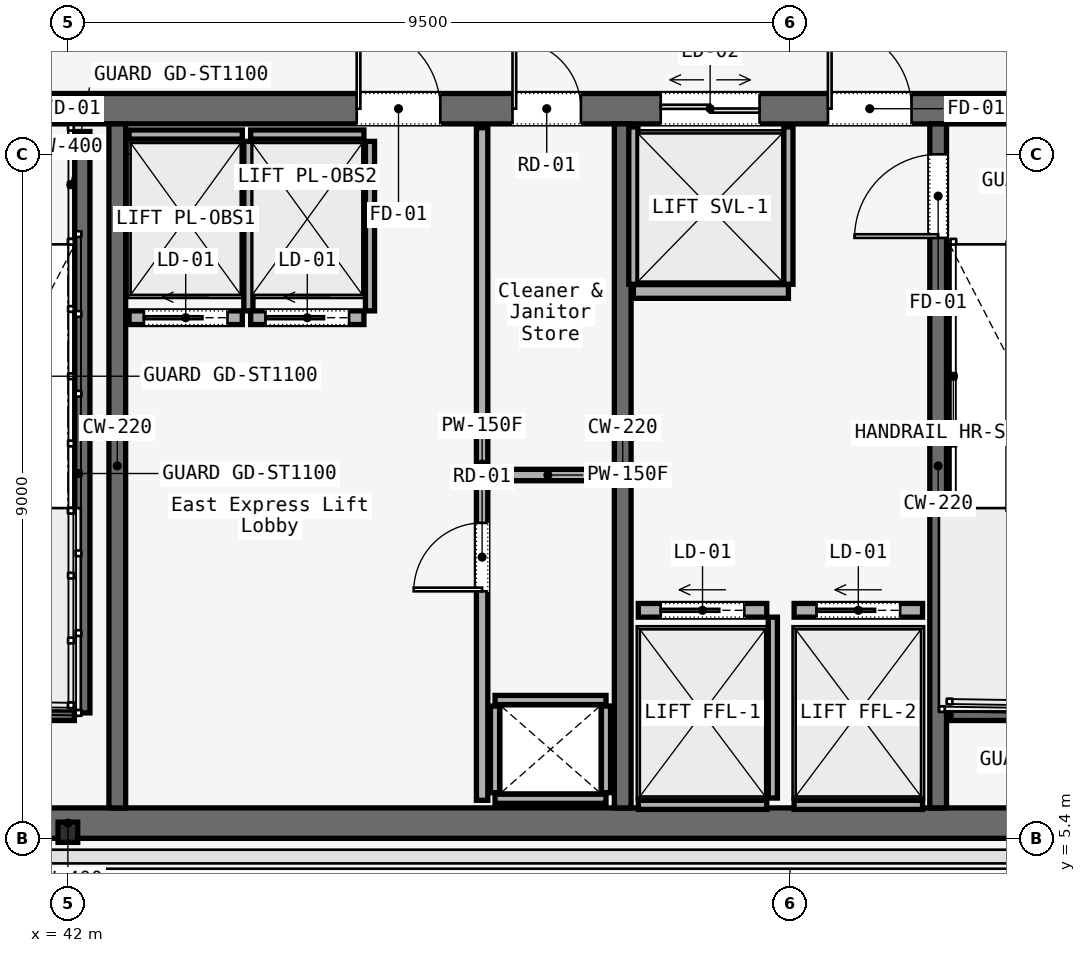
"""IFC4 building model, lengths in metres.
Left out: names, types, materials, properties, quantities, classifications, styles, units other than length and angle.
Written with IfcOpenShell. Run it as: python <this file> out.ifc"""

import sys

from ifc_helpers import new_model, si_unit, direction, frame, frame_2d, origin, origin_2d, place, context, subcontext, project, spatial, rectangle, i_section, extrude, element, fill, save


model = new_model("IFC4")
c1 = context("Model", 3, precision=1e-05, world=origin(), true_north=direction((0.0, 1.0)))
c2 = subcontext(c1, "Body", "Model", "MODEL_VIEW")
j1 = project(units=[si_unit("LENGTHUNIT", "METRE"), si_unit("PLANEANGLEUNIT", "RADIAN")], contexts=[c1])
p1 = place(None, origin())
s1 = spatial("IfcSite", under=j1, at=p1, CompositionType="ELEMENT")
p2 = place(p1, origin())
s2 = spatial("IfcBuilding", under=s1, at=p2, CompositionType="ELEMENT")
p3 = place(p2, frame((0.0, 0.0, 303.3)))
s3 = spatial("IfcBuildingStorey", under=s2, at=p3, CompositionType="ELEMENT", Elevation=303.3)
p4 = place(p3, frame((26.45, 15.0, 0.0), z_axis=(0.0, 0.0, 1.0), x_axis=(1.0, 0.0, 0.0)))
e1 = element("IfcWall", 1, at=p4, inside=s3, PredefinedType="SOLIDWALL", context=c2, shape_type="SweptSolid", body=[
    extrude(rectangle(XDim=31.1, YDim=0.4, at=frame_2d((15.55, 0.0))), origin(), (0.0, 0.0, 1.0), 4.4),
])
p5 = place(p4, frame((1.65, 0.0, 0.0)))
e2 = element("IfcOpeningElement", 2, at=p5, cuts=e1, PredefinedType="OPENING", context=c2, shape_type="SweptSolid", body=[
    extrude(rectangle(XDim=1.1, YDim=2.2, at=frame_2d((0.55, 1.1))), frame((0.0, 0.2, 0.0), z_axis=(0.0, -1.0, 0.0), x_axis=(1.0, 0.0, 0.0)), (0.0, 0.0, 1.0), 0.4),
])
p6 = place(p4, frame((13.65, 0.0, 0.0)))
e3 = element("IfcOpeningElement", 3, at=p6, cuts=e1, PredefinedType="OPENING", context=c2, shape_type="SweptSolid", body=[
    extrude(rectangle(XDim=1.1, YDim=2.2, at=frame_2d((0.55, 1.1))), frame((0.0, 0.2, 0.0), z_axis=(0.0, -1.0, 0.0), x_axis=(1.0, 0.0, 0.0)), (0.0, 0.0, 1.0), 0.4),
])
p7 = place(p4, frame((25.55, 0.0, 0.0)))
e4 = element("IfcOpeningElement", 4, at=p7, cuts=e1, PredefinedType="OPENING", context=c2, shape_type="SweptSolid", body=[
    extrude(rectangle(XDim=1.1, YDim=2.2, at=frame_2d((0.55, 1.1))), frame((0.0, 0.2, 0.0), z_axis=(0.0, -1.0, 0.0), x_axis=(1.0, 0.0, 0.0)), (0.0, 0.0, 1.0), 0.4),
])
p8 = place(p4, frame((19.35, 0.0, 0.0)))
e5 = element("IfcOpeningElement", 5, at=p8, cuts=e1, PredefinedType="OPENING", context=c2, shape_type="SweptSolid", body=[
    extrude(rectangle(XDim=1.1, YDim=2.2, at=frame_2d((0.55, 1.1))), frame((0.0, 0.2, 0.0), z_axis=(0.0, -1.0, 0.0), x_axis=(1.0, 0.0, 0.0)), (0.0, 0.0, 1.0), 0.4),
])
p9 = place(p4, frame((21.4, 0.0, 0.0)))
e6 = element("IfcOpeningElement", 6, at=p9, cuts=e1, PredefinedType="OPENING", context=c2, shape_type="SweptSolid", body=[
    extrude(rectangle(XDim=0.9, YDim=2.1, at=frame_2d((0.45, 1.05))), frame((0.0, 0.2, 0.0), z_axis=(0.0, -1.0, 0.0), x_axis=(1.0, 0.0, 0.0)), (0.0, 0.0, 1.0), 0.4),
])
p10 = place(p4, frame((6.04, 0.0, 0.0)))
e7 = element("IfcOpeningElement", 7, at=p10, cuts=e1, PredefinedType="OPENING", context=c2, shape_type="SweptSolid", body=[
    extrude(rectangle(XDim=0.95, YDim=2.2, at=frame_2d((0.475, 1.1))), frame((0.0, 0.2, 0.0), z_axis=(0.0, -1.0, 0.0), x_axis=(1.0, 0.0, 0.0)), (0.0, 0.0, 1.0), 0.4),
])
p11 = place(p4, frame((9.99, 0.0, 0.0)))
e8 = element("IfcOpeningElement", 8, at=p11, cuts=e1, PredefinedType="OPENING", context=c2, shape_type="SweptSolid", body=[
    extrude(rectangle(XDim=0.95, YDim=2.2, at=frame_2d((0.475, 1.1))), frame((0.0, 0.2, 0.0), z_axis=(0.0, -1.0, 0.0), x_axis=(1.0, 0.0, 0.0)), (0.0, 0.0, 1.0), 0.4),
])
p12 = place(p4, frame((23.35, 0.0, 0.0)))
e9 = element("IfcOpeningElement", 9, at=p12, cuts=e1, PredefinedType="OPENING", context=c2, shape_type="SweptSolid", body=[
    extrude(rectangle(XDim=1.3, YDim=2.3, at=frame_2d((0.65, 1.15))), frame((0.0, 0.2, 0.0), z_axis=(0.0, -1.0, 0.0), x_axis=(1.0, 0.0, 0.0)), (0.0, 0.0, 1.0), 0.4),
])
p13 = place(p3, frame((26.45, 5.6, 0.0), z_axis=(0.0, 0.0, 1.0), x_axis=(1.0, 0.0, 0.0)))
e10 = element("IfcWall", 10, at=p13, inside=s3, PredefinedType="SOLIDWALL", context=c2, shape_type="SweptSolid", body=[
    extrude(rectangle(XDim=31.1, YDim=0.4, at=frame_2d((15.55, 0.0))), origin(), (0.0, 0.0, 1.0), 4.4),
])
for number, where, z_axis, x_axis in (
    (11, (42.65, 5.8, 0.0), (0.0, 0.0, 1.0), (0.0, 1.0, 0.0)),
    (12, (49.3, 5.8, 0.0), (0.0, 0.0, 1.0), (0.0, 1.0, 0.0)),
):
    element("IfcWall", number, at=place(p3, frame(where, z_axis=z_axis, x_axis=x_axis)), inside=s3, PredefinedType="SOLIDWALL", context=c2, shape_type="SweptSolid", body=[
        extrude(rectangle(XDim=9.0, YDim=0.22, at=frame_2d((4.5, 0.0))), origin(), (0.0, 0.0, 1.0), 4.4),
    ])
p14 = place(p3, frame((53.45, 5.8, 0.0), z_axis=(0.0, 0.0, 1.0), x_axis=(0.0, 1.0, 0.0)))
e13 = element("IfcWall", 13, at=p14, inside=s3, PredefinedType="SOLIDWALL", context=c2, shape_type="SweptSolid", body=[
    extrude(rectangle(XDim=9.0, YDim=0.22, at=frame_2d((4.5, 0.0))), origin(), (0.0, 0.0, 1.0), 4.4),
])
p15 = place(p14, frame((7.5, 0.0, 0.0)))
e14 = element("IfcOpeningElement", 14, at=p15, cuts=e13, PredefinedType="OPENING", context=c2, shape_type="SweptSolid", body=[
    extrude(rectangle(XDim=1.1, YDim=2.2, at=frame_2d((0.55, 1.1))), frame((0.0, 0.11, 0.0), z_axis=(0.0, -1.0, 0.0), x_axis=(1.0, 0.0, 0.0)), (0.0, 0.0, 1.0), 0.22),
])
p16 = place(p3, frame((42.0, 5.48, 0.0), z_axis=(0.0, 0.0, 1.0), x_axis=(1.0, 0.0, 0.0)))
e15 = element("IfcColumn", 15, at=p16, inside=s3, PredefinedType="COLUMN", context=c2, shape_type="SweptSolid", body=[
    extrude(i_section(OverallWidth=0.259, OverallDepth=0.267, WebThickness=0.013, FlangeThickness=0.021, FilletRadius=0.013, at=origin_2d()), origin(), (0.0, 0.0, 1.0), 4.4),
])
p17 = place(p3, frame((42.19, 14.7, 0.0), z_axis=(0.0, 0.0, 1.0), x_axis=(0.0, -1.0, 0.0)))
e16 = element("IfcWall", 16, at=p17, inside=s3, PredefinedType="SOLIDWALL", context=c2, shape_type="SweptSolid", body=[
    extrude(rectangle(XDim=7.65, YDim=0.2, at=frame_2d((3.825, 0.0))), origin(), (0.0, 0.0, 1.0), 4.8),
])
for number, where, z_axis, x_axis in (
    (17, (38.97, 7.05, 0.0), (0.0, 0.0, 1.0), (1.0, 0.0, 0.0)),
    (18, (53.62, 7.05, 0.0), (0.0, 0.0, 1.0), (1.0, 0.0, 0.0)),
):
    element("IfcWall", number, at=place(p3, frame(where, z_axis=z_axis, x_axis=x_axis)), inside=s3, PredefinedType="SOLIDWALL", context=c2, shape_type="SweptSolid", body=[
        extrude(rectangle(XDim=3.115, YDim=0.2, at=frame_2d((1.558, 0.0))), origin(), (0.0, 0.0, 1.0), 4.8),
    ])
for number, where, z_axis, x_axis in (
    (19, (47.62, 5.92, 0.0), (0.0, 0.0, 1.0), (1.0, 0.0, 0.0)),
    (20, (47.62, 7.22, 0.0), (0.0, 0.0, 1.0), (1.0, 0.0, 0.0)),
):
    element("IfcWall", number, at=place(p3, frame(where, z_axis=z_axis, x_axis=x_axis)), inside=s3, PredefinedType="SOLIDWALL", context=c2, shape_type="SweptSolid", body=[
        extrude(rectangle(XDim=1.46, YDim=0.12, at=frame_2d((0.73, 0.0))), origin(), (0.0, 0.0, 1.0), 4.36),
    ])
for number, where, z_axis, x_axis in (
    (21, (47.62, 6.0, 0.0), (0.0, 0.0, 1.0), (0.0, 1.0, 0.0)),
    (22, (49.08, 6.0, 0.0), (0.0, 0.0, 1.0), (0.0, 1.0, 0.0)),
):
    element("IfcWall", number, at=place(p3, frame(where, z_axis=z_axis, x_axis=x_axis)), inside=s3, PredefinedType="SOLIDWALL", context=c2, shape_type="SweptSolid", body=[
        extrude(rectangle(XDim=1.14, YDim=0.12, at=frame_2d((0.57, 0.0))), origin(), (0.0, 0.0, 1.0), 4.36),
    ])
p18 = place(p3, frame((47.45, 5.9, 0.0), z_axis=(0.0, 0.0, 1.0), x_axis=(0.0, 1.0, 0.0)))
e23 = element("IfcWall", 23, at=p18, inside=s3, PredefinedType="PARTITIONING", context=c2, shape_type="SweptSolid", body=[
    extrude(rectangle(XDim=8.85, YDim=0.15, at=frame_2d((4.425, 0.0))), origin(), (0.0, 0.0, 1.0), 4.36),
])
p19 = place(p18, frame((2.75, 0.0, 0.0)))
e24 = element("IfcOpeningElement", 24, at=p19, cuts=e23, PredefinedType="OPENING", context=c2, shape_type="SweptSolid", body=[
    extrude(rectangle(XDim=0.9, YDim=2.1, at=frame_2d((0.45, 1.05))), frame((0.0, 0.075, 0.0), z_axis=(0.0, -1.0, 0.0), x_axis=(1.0, 0.0, 0.0)), (0.0, 0.0, 1.0), 0.15),
])
p20 = place(p3, frame((47.45, 10.18, 0.0), z_axis=(0.0, 0.0, 1.0), x_axis=(1.0, 0.0, 0.0)))
e25 = element("IfcWall", 25, at=p20, inside=s3, PredefinedType="PARTITIONING", context=c2, shape_type="SweptSolid", body=[
    extrude(rectangle(XDim=1.73, YDim=0.15, at=frame_2d((0.865, 0.0))), origin(), (0.0, 0.0, 1.0), 4.36),
])
p21 = place(p3, frame((42.805, 12.25, 0.0), z_axis=(0.0, 0.0, 1.0), x_axis=(1.0, 0.0, 0.0)))
e26 = element("IfcWall", 26, at=p21, inside=s3, PredefinedType="SOLIDWALL", context=c2, shape_type="SweptSolid", body=[
    extrude(rectangle(XDim=1.49, YDim=0.18, at=frame_2d((0.745, 0.0))), origin(), (0.0, 0.0, 1.0), 4.36),
])
p22 = place(p21, frame((0.195, 0.0, 0.0)))
e27 = element("IfcOpeningElement", 27, at=p22, cuts=e26, PredefinedType="OPENING", context=c2, shape_type="SweptSolid", body=[
    extrude(rectangle(XDim=1.1, YDim=2.2, at=frame_2d((0.55, 1.1))), frame((0.0, 0.09, 0.0), z_axis=(0.0, -1.0, 0.0), x_axis=(1.0, 0.0, 0.0)), (0.0, 0.0, 1.0), 0.18),
])
p23 = place(p3, frame((42.805, 14.66, 0.0), z_axis=(0.0, 0.0, 1.0), x_axis=(1.0, 0.0, 0.0)))
e28 = element("IfcWall", 28, at=p23, inside=s3, PredefinedType="SOLIDWALL", context=c2, shape_type="SweptSolid", body=[
    extrude(rectangle(XDim=1.49, YDim=0.12, at=frame_2d((0.745, 0.0))), origin(), (0.0, 0.0, 1.0), 4.36),
])
p24 = place(p3, frame((44.375, 12.34, 0.0), z_axis=(0.0, 0.0, 1.0), x_axis=(0.0, 1.0, 0.0)))
e29 = element("IfcWall", 29, at=p24, inside=s3, PredefinedType="SOLIDWALL", context=c2, shape_type="SweptSolid", body=[
    extrude(rectangle(XDim=2.23, YDim=0.12, at=frame_2d((1.115, 0.0))), origin(), (0.0, 0.0, 1.0), 4.36),
])
p25 = place(p3, frame((44.405, 12.25, 0.0), z_axis=(0.0, 0.0, 1.0), x_axis=(1.0, 0.0, 0.0)))
e30 = element("IfcWall", 30, at=p25, inside=s3, PredefinedType="SOLIDWALL", context=c2, shape_type="SweptSolid", body=[
    extrude(rectangle(XDim=1.49, YDim=0.18, at=frame_2d((0.745, 0.0))), origin(), (0.0, 0.0, 1.0), 4.36),
])
p26 = place(p25, frame((0.195, 0.0, 0.0)))
e31 = element("IfcOpeningElement", 31, at=p26, cuts=e30, PredefinedType="OPENING", context=c2, shape_type="SweptSolid", body=[
    extrude(rectangle(XDim=1.1, YDim=2.2, at=frame_2d((0.55, 1.1))), frame((0.0, 0.09, 0.0), z_axis=(0.0, -1.0, 0.0), x_axis=(1.0, 0.0, 0.0)), (0.0, 0.0, 1.0), 0.18),
])
p27 = place(p3, frame((44.405, 14.66, 0.0), z_axis=(0.0, 0.0, 1.0), x_axis=(1.0, 0.0, 0.0)))
e32 = element("IfcWall", 32, at=p27, inside=s3, PredefinedType="SOLIDWALL", context=c2, shape_type="SweptSolid", body=[
    extrude(rectangle(XDim=1.49, YDim=0.12, at=frame_2d((0.745, 0.0))), origin(), (0.0, 0.0, 1.0), 4.36),
])
p28 = place(p3, frame((45.975, 12.34, 0.0), z_axis=(0.0, 0.0, 1.0), x_axis=(0.0, 1.0, 0.0)))
e33 = element("IfcWall", 33, at=p28, inside=s3, PredefinedType="SOLIDWALL", context=c2, shape_type="SweptSolid", body=[
    extrude(rectangle(XDim=2.23, YDim=0.12, at=frame_2d((1.115, 0.0))), origin(), (0.0, 0.0, 1.0), 4.36),
])
p29 = place(p3, frame((49.505, 8.4, 0.0), z_axis=(0.0, 0.0, 1.0), x_axis=(1.0, 0.0, 0.0)))
e34 = element("IfcWall", 34, at=p29, inside=s3, PredefinedType="SOLIDWALL", context=c2, shape_type="SweptSolid", body=[
    extrude(rectangle(XDim=1.69, YDim=0.18, at=frame_2d((0.845, 0.0))), origin(), (0.0, 0.0, 1.0), 4.36),
])
p30 = place(p29, frame((0.295, 0.0, 0.0)))
e35 = element("IfcOpeningElement", 35, at=p30, cuts=e34, PredefinedType="OPENING", context=c2, shape_type="SweptSolid", body=[
    extrude(rectangle(XDim=1.1, YDim=2.2, at=frame_2d((0.55, 1.1))), frame((0.0, 0.09, 0.0), z_axis=(0.0, -1.0, 0.0), x_axis=(1.0, 0.0, 0.0)), (0.0, 0.0, 1.0), 0.18),
])
p31 = place(p3, frame((49.505, 5.84, 0.0), z_axis=(0.0, 0.0, 1.0), x_axis=(1.0, 0.0, 0.0)))
e36 = element("IfcWall", 36, at=p31, inside=s3, PredefinedType="SOLIDWALL", context=c2, shape_type="SweptSolid", body=[
    extrude(rectangle(XDim=1.69, YDim=0.12, at=frame_2d((0.845, 0.0))), origin(), (0.0, 0.0, 1.0), 4.36),
])
p32 = place(p3, frame((51.275, 5.93, 0.0), z_axis=(0.0, 0.0, 1.0), x_axis=(0.0, 1.0, 0.0)))
e37 = element("IfcWall", 37, at=p32, inside=s3, PredefinedType="SOLIDWALL", context=c2, shape_type="SweptSolid", body=[
    extrude(rectangle(XDim=2.38, YDim=0.12, at=frame_2d((1.19, 0.0))), origin(), (0.0, 0.0, 1.0), 4.36),
])
p33 = place(p3, frame((51.555, 8.4, 0.0), z_axis=(0.0, 0.0, 1.0), x_axis=(1.0, 0.0, 0.0)))
e38 = element("IfcWall", 38, at=p33, inside=s3, PredefinedType="SOLIDWALL", context=c2, shape_type="SweptSolid", body=[
    extrude(rectangle(XDim=1.69, YDim=0.18, at=frame_2d((0.845, 0.0))), origin(), (0.0, 0.0, 1.0), 4.36),
])
p34 = place(p33, frame((0.295, 0.0, 0.0)))
e39 = element("IfcOpeningElement", 39, at=p34, cuts=e38, PredefinedType="OPENING", context=c2, shape_type="SweptSolid", body=[
    extrude(rectangle(XDim=1.1, YDim=2.2, at=frame_2d((0.55, 1.1))), frame((0.0, 0.09, 0.0), z_axis=(0.0, -1.0, 0.0), x_axis=(1.0, 0.0, 0.0)), (0.0, 0.0, 1.0), 0.18),
])
p35 = place(p3, frame((51.555, 5.84, 0.0), z_axis=(0.0, 0.0, 1.0), x_axis=(1.0, 0.0, 0.0)))
e40 = element("IfcWall", 40, at=p35, inside=s3, PredefinedType="SOLIDWALL", context=c2, shape_type="SweptSolid", body=[
    extrude(rectangle(XDim=1.69, YDim=0.12, at=frame_2d((0.845, 0.0))), origin(), (0.0, 0.0, 1.0), 4.36),
])
p36 = place(p3, frame((49.44, 12.595, 0.0), z_axis=(0.0, 0.0, 1.0), x_axis=(1.0, 0.0, 0.0)))
e41 = element("IfcWall", 41, at=p36, inside=s3, PredefinedType="SOLIDWALL", context=c2, shape_type="SweptSolid", body=[
    extrude(rectangle(XDim=2.04, YDim=0.18, at=frame_2d((1.02, 0.0))), origin(), (0.0, 0.0, 1.0), 4.36),
])
for number, where, z_axis, x_axis in (
    (42, (49.44, 12.69, 0.0), (0.0, 0.0, 1.0), (0.0, 1.0, 0.0)),
    (43, (51.48, 12.69, 0.0), (0.0, 0.0, 1.0), (0.0, 1.0, 0.0)),
):
    element("IfcWall", number, at=place(p3, frame(where, z_axis=z_axis, x_axis=x_axis)), inside=s3, PredefinedType="SOLIDWALL", context=c2, shape_type="SweptSolid", body=[
        extrude(rectangle(XDim=2.07, YDim=0.12, at=frame_2d((1.035, 0.0))), origin(), (0.0, 0.0, 1.0), 4.36),
    ])
p37 = place(p7, origin())
e44 = element("IfcDoor", 44, at=p37, inside=s3, OperationType="SINGLE_SWING_RIGHT", PredefinedType="DOOR", context=c2, shape_type="SweptSolid", body=[
    extrude(rectangle(XDim=1.1, YDim=2.2, at=frame_2d((0.55, 1.1))), frame((0.0, 0.025, 0.0), z_axis=(0.0, -1.0, 0.0), x_axis=(1.0, 0.0, 0.0)), (0.0, 0.0, 1.0), 0.05),
])
fill(e4, e44)
p38 = place(p8, origin())
e45 = element("IfcDoor", 45, at=p38, inside=s3, OperationType="SINGLE_SWING_LEFT", PredefinedType="DOOR", context=c2, shape_type="SweptSolid", body=[
    extrude(rectangle(XDim=1.1, YDim=2.2, at=frame_2d((0.55, 1.1))), frame((0.0, 0.025, 0.0), z_axis=(0.0, -1.0, 0.0), x_axis=(1.0, 0.0, 0.0)), (0.0, 0.0, 1.0), 0.05),
])
fill(e5, e45)
p39 = place(p9, origin())
e46 = element("IfcDoor", 46, at=p39, inside=s3, OperationType="SINGLE_SWING_LEFT", PredefinedType="DOOR", context=c2, shape_type="SweptSolid", body=[
    extrude(rectangle(XDim=0.9, YDim=2.1, at=frame_2d((0.45, 1.05))), frame((0.0, 0.025, 0.0), z_axis=(0.0, -1.0, 0.0), x_axis=(1.0, 0.0, 0.0)), (0.0, 0.0, 1.0), 0.05),
])
fill(e6, e46)
p40 = place(p15, origin())
e47 = element("IfcDoor", 47, at=p40, inside=s3, OperationType="SINGLE_SWING_LEFT", PredefinedType="DOOR", context=c2, shape_type="SweptSolid", body=[
    extrude(rectangle(XDim=1.1, YDim=2.2, at=frame_2d((0.55, 1.1))), frame((0.0, 0.025, 0.0), z_axis=(0.0, -1.0, 0.0), x_axis=(1.0, 0.0, 0.0)), (0.0, 0.0, 1.0), 0.05),
])
fill(e14, e47)
p41 = place(p19, origin())
e48 = element("IfcDoor", 48, at=p41, inside=s3, OperationType="SINGLE_SWING_RIGHT", PredefinedType="DOOR", context=c2, shape_type="SweptSolid", body=[
    extrude(rectangle(XDim=0.9, YDim=2.1, at=frame_2d((0.45, 1.05))), frame((0.0, 0.025, 0.0), z_axis=(0.0, -1.0, 0.0), x_axis=(1.0, 0.0, 0.0)), (0.0, 0.0, 1.0), 0.05),
])
fill(e24, e48)
p42 = place(p22, origin())
e49 = element("IfcDoor", 49, at=p42, inside=s3, OperationType="SLIDING_TO_LEFT", PredefinedType="DOOR", context=c2, shape_type="SweptSolid", body=[
    extrude(rectangle(XDim=1.1, YDim=2.2, at=frame_2d((0.55, 1.1))), frame((0.0, 0.025, 0.0), z_axis=(0.0, -1.0, 0.0), x_axis=(1.0, 0.0, 0.0)), (0.0, 0.0, 1.0), 0.05),
])
fill(e27, e49)
p43 = place(p26, origin())
e50 = element("IfcDoor", 50, at=p43, inside=s3, OperationType="SLIDING_TO_LEFT", PredefinedType="DOOR", context=c2, shape_type="SweptSolid", body=[
    extrude(rectangle(XDim=1.1, YDim=2.2, at=frame_2d((0.55, 1.1))), frame((0.0, 0.025, 0.0), z_axis=(0.0, -1.0, 0.0), x_axis=(1.0, 0.0, 0.0)), (0.0, 0.0, 1.0), 0.05),
])
fill(e31, e50)
p44 = place(p30, origin())
e51 = element("IfcDoor", 51, at=p44, inside=s3, OperationType="SLIDING_TO_LEFT", PredefinedType="DOOR", context=c2, shape_type="SweptSolid", body=[
    extrude(rectangle(XDim=1.1, YDim=2.2, at=frame_2d((0.55, 1.1))), frame((0.0, 0.025, 0.0), z_axis=(0.0, -1.0, 0.0), x_axis=(1.0, 0.0, 0.0)), (0.0, 0.0, 1.0), 0.05),
])
fill(e35, e51)
p45 = place(p34, origin())
e52 = element("IfcDoor", 52, at=p45, inside=s3, OperationType="SLIDING_TO_LEFT", PredefinedType="DOOR", context=c2, shape_type="SweptSolid", body=[
    extrude(rectangle(XDim=1.1, YDim=2.2, at=frame_2d((0.55, 1.1))), frame((0.0, 0.025, 0.0), z_axis=(0.0, -1.0, 0.0), x_axis=(1.0, 0.0, 0.0)), (0.0, 0.0, 1.0), 0.05),
])
fill(e39, e52)
p46 = place(p12, origin())
e53 = element("IfcDoor", 53, at=p46, inside=s3, OperationType="DOUBLE_DOOR_SLIDING", PredefinedType="DOOR", context=c2, shape_type="SweptSolid", body=[
    extrude(rectangle(XDim=1.3, YDim=2.3, at=frame_2d((0.65, 1.15))), frame((0.0, 0.025, 0.0), z_axis=(0.0, -1.0, 0.0), x_axis=(1.0, 0.0, 0.0)), (0.0, 0.0, 1.0), 0.05),
])
fill(e9, e53)
save(model, sys.argv[1])
